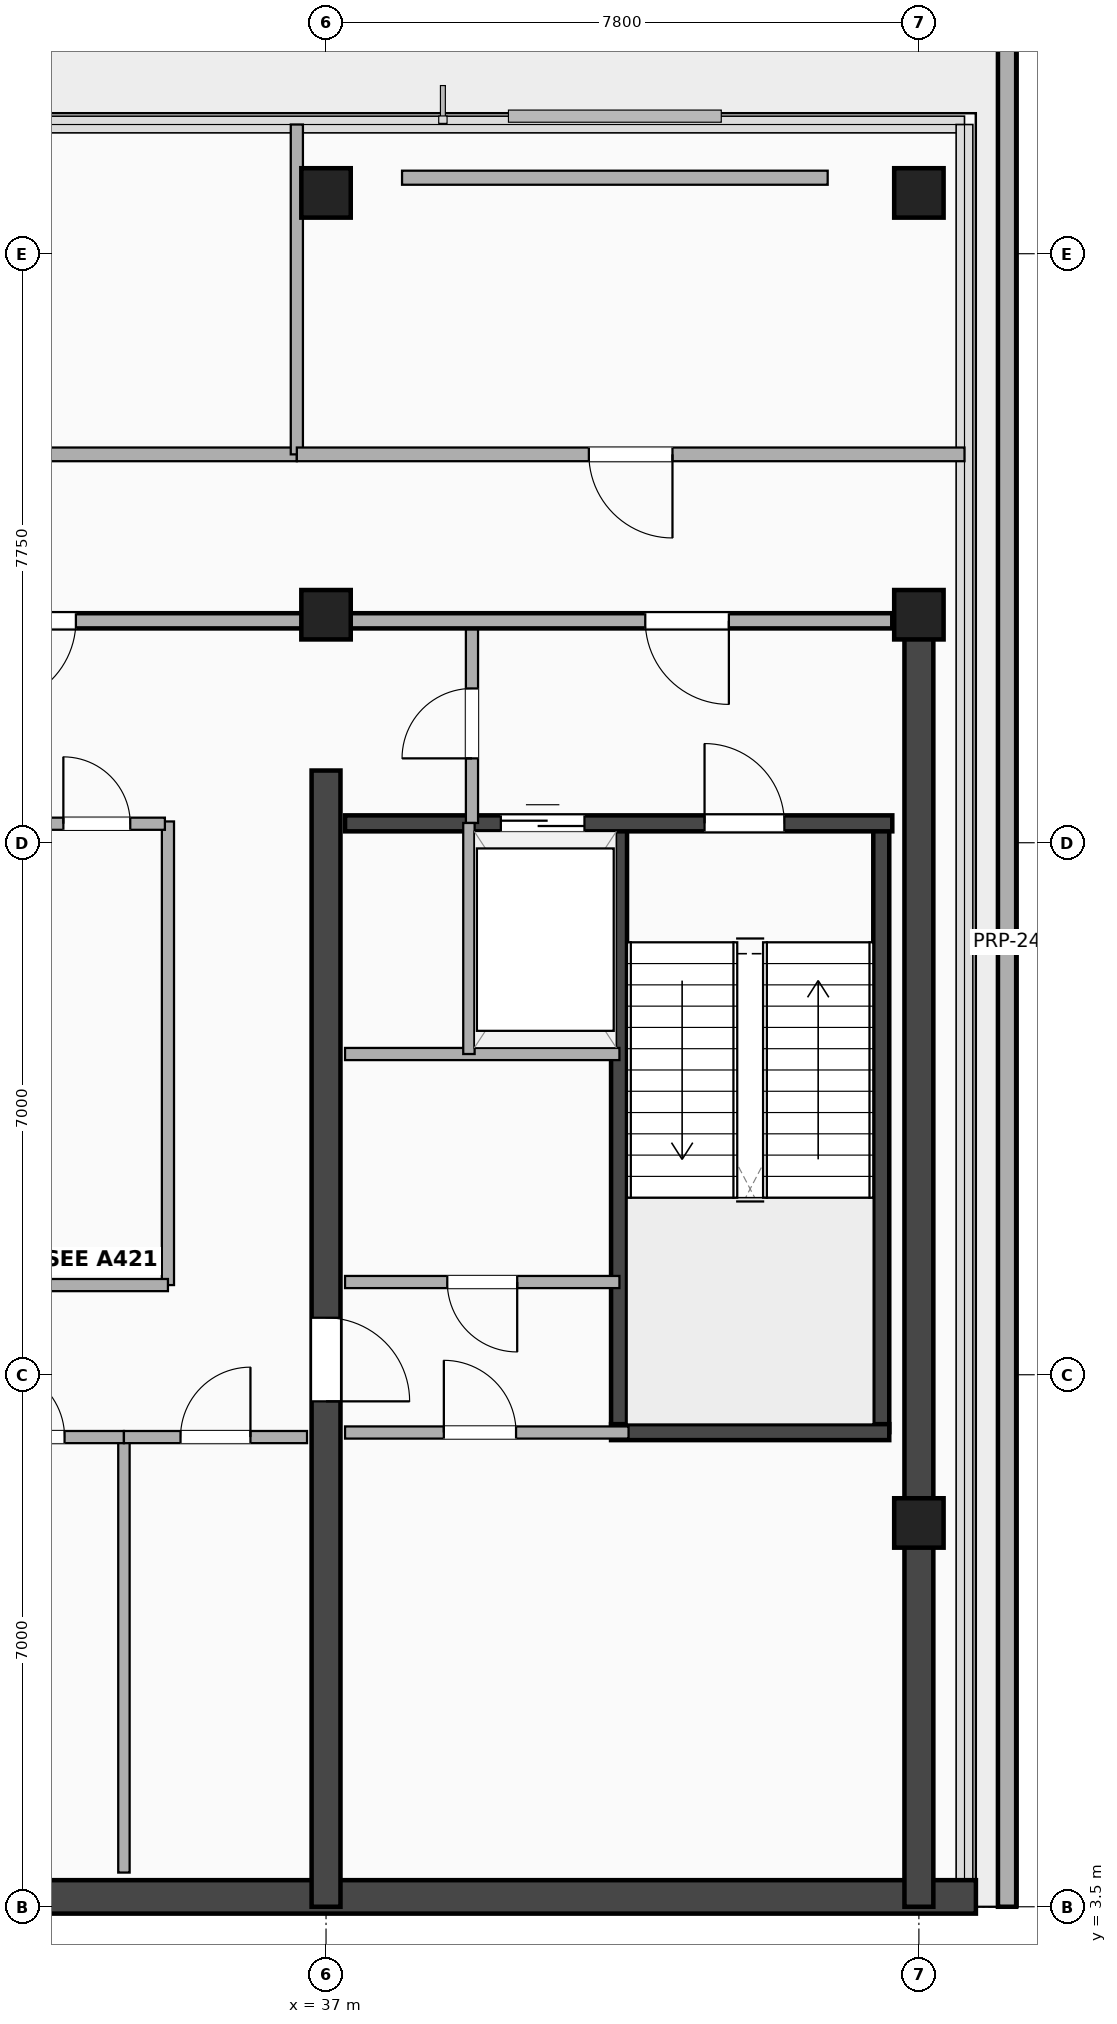
"""IFC4 building model, lengths in metres.
Left out: names, types, materials, properties, quantities, classifications, styles, units other than length and angle.
Written with IfcOpenShell. Run it as: python <this file> out.ifc"""

import sys

from ifc_helpers import new_model, si_unit, direction, frame, frame_2d, origin, origin_2d, place, context, subcontext, project, spatial, rectangle, extrude, element, fill, save


model = new_model("IFC4")
c1 = context("Model", 3, precision=1e-05, world=origin(), true_north=direction((0.0, 1.0)))
c2 = subcontext(c1, "Body", "Model", "MODEL_VIEW")
j1 = project(units=[si_unit("LENGTHUNIT", "METRE"), si_unit("PLANEANGLEUNIT", "RADIAN")], contexts=[c1])
p1 = place(None, origin())
s1 = spatial("IfcSite", under=j1, at=p1, CompositionType="ELEMENT")
p2 = place(p1, origin())
s2 = spatial("IfcBuilding", under=s1, at=p2, CompositionType="ELEMENT")
p3 = place(p2, frame((0.0, 0.0, 303.3)))
s3 = spatial("IfcBuildingStorey", under=s2, at=p3, CompositionType="ELEMENT", Elevation=303.3)
p4 = place(p3, frame((17.8, 3.63, 0.0), z_axis=(0.0, 0.0, 1.0), x_axis=(1.0, 0.0, 0.0)))
e1 = element("IfcWall", 1, at=p4, inside=s3, PredefinedType="SHEAR", context=c2, shape_type="SweptSolid", body=[
    extrude(rectangle(XDim=27.75, YDim=0.44, at=frame_2d((13.875, 0.0))), origin(), (0.0, 0.0, 1.0), 4.3),
])
p5 = place(p3, frame((44.8, 3.5, 0.0), z_axis=(0.0, 0.0, 1.0), x_axis=(0.0, 1.0, 0.0)))
e2 = element("IfcWall", 2, at=p5, inside=s3, PredefinedType="SHEAR", context=c2, shape_type="SweptSolid", body=[
    extrude(rectangle(XDim=16.9, YDim=0.38, at=frame_2d((8.45, 0.0))), origin(), (0.0, 0.0, 1.0), 4.3),
])
p6 = place(p3, frame((37.0, 3.5, 0.0), z_axis=(0.0, 0.0, 1.0), x_axis=(0.0, 1.0, 0.0)))
e3 = element("IfcWall", 3, at=p6, inside=s3, PredefinedType="SHEAR", context=c2, shape_type="SweptSolid", body=[
    extrude(rectangle(XDim=14.95, YDim=0.38, at=frame_2d((7.475, 0.0))), origin(), (0.0, 0.0, 1.0), 4.3),
])
p7 = place(p6, frame((6.65, 0.0, 0.0)))
e4 = element("IfcOpeningElement", 4, at=p7, cuts=e3, PredefinedType="OPENING", context=c2, shape_type="SweptSolid", body=[
    extrude(rectangle(XDim=1.1, YDim=2.15, at=frame_2d((0.55, 1.075))), frame((0.0, 0.2, 0.0), z_axis=(0.0, -1.0, 0.0), x_axis=(1.0, 0.0, 0.0)), (0.0, 0.0, 1.0), 0.4),
])
for number, where, z_axis, x_axis in (
    (5, (40.855, 9.745, 0.0), (0.0, 0.0, 1.0), (0.0, 1.0, 0.0)),
    (6, (44.305, 9.745, 0.0), (0.0, 0.0, 1.0), (0.0, 1.0, 0.0)),
):
    element("IfcWall", number, at=place(p3, frame(where, z_axis=z_axis, x_axis=x_axis)), inside=s3, PredefinedType="SHEAR", context=c2, shape_type="SweptSolid", body=[
        extrude(rectangle(XDim=8.01, YDim=0.21, at=frame_2d((4.005, 0.0))), origin(), (0.0, 0.0, 1.0), 4.3),
    ])
p8 = place(p3, frame((40.75, 9.745, 0.0), z_axis=(0.0, 0.0, 1.0), x_axis=(1.0, 0.0, 0.0)))
e7 = element("IfcWall", 7, at=p8, inside=s3, PredefinedType="SHEAR", context=c2, shape_type="SweptSolid", body=[
    extrude(rectangle(XDim=3.66, YDim=0.21, at=frame_2d((1.83, 0.0))), origin(), (0.0, 0.0, 1.0), 4.3),
])
p9 = place(p3, frame((37.25, 17.755, 0.0), z_axis=(0.0, 0.0, 1.0), x_axis=(1.0, 0.0, 0.0)))
e8 = element("IfcWall", 8, at=p9, inside=s3, PredefinedType="SHEAR", context=c2, shape_type="SweptSolid", body=[
    extrude(rectangle(XDim=7.2, YDim=0.21, at=frame_2d((3.6, 0.0))), origin(), (0.0, 0.0, 1.0), 4.3),
])
p10 = place(p9, frame((2.05, 0.0, 0.0)))
e9 = element("IfcOpeningElement", 9, at=p10, cuts=e8, PredefinedType="OPENING", context=c2, shape_type="SweptSolid", body=[
    extrude(rectangle(XDim=1.1, YDim=2.18, at=frame_2d((0.55, 1.09))), frame((0.0, 0.115, 0.0), z_axis=(0.0, -1.0, 0.0), x_axis=(1.0, 0.0, 0.0)), (0.0, 0.0, 1.0), 0.23),
])
p11 = place(p9, frame((5.78, 0.0, 0.0), z_axis=(0.0, 0.0, 1.0), x_axis=(-1.0, 0.0, 0.0)))
e10 = element("IfcOpeningElement", 10, at=p11, cuts=e8, PredefinedType="OPENING", context=c2, shape_type="SweptSolid", body=[
    extrude(rectangle(XDim=1.05, YDim=2.15, at=frame_2d((0.525, 1.075))), frame((0.0, 0.115, 0.0), z_axis=(0.0, -1.0, 0.0), x_axis=(1.0, 0.0, 0.0)), (0.0, 0.0, 1.0), 0.23),
])
for number, where, z_axis, x_axis in (
    (11, (44.8, 8.55, -0.3), (0.0, 0.0, 1.0), (1.0, 0.0, 0.0)),
    (12, (37.0, 20.5, -0.3), (0.0, 0.0, 1.0), (1.0, 0.0, 0.0)),
    (13, (44.8, 20.5, -0.3), (0.0, 0.0, 1.0), (1.0, 0.0, 0.0)),
    (14, (37.0, 26.05, -0.3), (0.0, 0.0, 1.0), (1.0, 0.0, 0.0)),
    (15, (44.8, 26.05, -0.3), (0.0, 0.0, 1.0), (1.0, 0.0, 0.0)),
):
    element("IfcColumn", number, at=place(p3, frame(where, z_axis=z_axis, x_axis=x_axis)), inside=s3, PredefinedType="COLUMN", context=c2, shape_type="SweptSolid", body=[
        extrude(rectangle(XDim=0.65, YDim=0.65, at=origin_2d()), origin(), (0.0, 0.0, 1.0), 4.6),
    ])
p12 = place(p3, frame((45.96, 3.5, 0.0), z_axis=(0.0, 0.0, 1.0), x_axis=(0.0, 1.0, 0.0)))
e16 = element("IfcWall", 16, at=p12, inside=s3, PredefinedType="PARAPET", context=c2, shape_type="SweptSolid", body=[
    extrude(rectangle(XDim=24.7, YDim=0.24, at=frame_2d((12.35, 0.0))), origin(), (0.0, 0.0, 1.0), 1.25),
])
p13 = place(p3, frame((38.0, 26.25, 0.0), z_axis=(0.0, 0.0, 1.0), x_axis=(1.0, 0.0, 0.0)))
e17 = element("IfcWall", 17, at=p13, inside=s3, PredefinedType="ELEMENTEDWALL", context=c2, shape_type="SweptSolid", body=[
    extrude(rectangle(XDim=5.6, YDim=0.185, at=frame_2d((2.8, 0.0))), origin(), (0.0, 0.0, 1.0), 3.885),
])
p14 = place(p3, frame((38.92, 17.76, 0.0), z_axis=(0.0, 0.0, 1.0), x_axis=(0.0, 1.0, 0.0)))
e18 = element("IfcWall", 18, at=p14, inside=s3, PredefinedType="PARTITIONING", context=c2, shape_type="SweptSolid", body=[
    extrude(rectangle(XDim=2.66, YDim=0.16, at=frame_2d((1.33, 0.0))), origin(), (0.0, 0.0, 1.0), 3.885),
])
p15 = place(p14, frame((1.77, 0.0, 0.0), z_axis=(0.0, 0.0, 1.0), x_axis=(-1.0, 0.0, 0.0)))
e19 = element("IfcOpeningElement", 19, at=p15, cuts=e18, PredefinedType="OPENING", context=c2, shape_type="SweptSolid", body=[
    extrude(rectangle(XDim=0.92, YDim=2.08, at=frame_2d((0.46, 1.04))), frame((0.0, 0.09, 0.0), z_axis=(0.0, -1.0, 0.0), x_axis=(1.0, 0.0, 0.0)), (0.0, 0.0, 1.0), 0.18),
])
p16 = place(p3, frame((37.25, 14.72, 0.0), z_axis=(0.0, 0.0, 1.0), x_axis=(1.0, 0.0, 0.0)))
e20 = element("IfcWall", 20, at=p16, inside=s3, PredefinedType="PARTITIONING", context=c2, shape_type="SweptSolid", body=[
    extrude(rectangle(XDim=3.61, YDim=0.16, at=frame_2d((1.805, 0.0))), origin(), (0.0, 0.0, 1.0), 4.3),
])
p17 = place(p3, frame((38.88, 14.72, 0.0), z_axis=(0.0, 0.0, 1.0), x_axis=(0.0, 1.0, 0.0)))
e21 = element("IfcWall", 21, at=p17, inside=s3, PredefinedType="PARTITIONING", context=c2, shape_type="SweptSolid", body=[
    extrude(rectangle(XDim=3.04, YDim=0.15, at=frame_2d((1.52, 0.0))), origin(), (0.0, 0.0, 1.0), 4.3),
])
p18 = place(p3, frame((29.2, 20.42, 0.0), z_axis=(0.0, 0.0, 1.0), x_axis=(1.0, 0.0, 0.0)))
e22 = element("IfcWall", 22, at=p18, inside=s3, PredefinedType="PARTITIONING", context=c2, shape_type="SweptSolid", body=[
    extrude(rectangle(XDim=7.8, YDim=0.2, at=frame_2d((3.9, 0.0))), origin(), (0.0, 0.0, 1.0), 2.605),
])
p19 = place(p18, frame((3.409, 0.0, 0.0)))
e23 = element("IfcOpeningElement", 23, at=p19, cuts=e22, PredefinedType="OPENING", context=c2, shape_type="SweptSolid", body=[
    extrude(rectangle(XDim=1.1, YDim=2.15, at=frame_2d((0.55, 1.075))), frame((0.0, 0.11, 0.0), z_axis=(0.0, -1.0, 0.0), x_axis=(1.0, 0.0, 0.0)), (0.0, 0.0, 1.0), 0.22),
])
p20 = place(p3, frame((37.0, 20.42, 0.0), z_axis=(0.0, 0.0, 1.0), x_axis=(1.0, 0.0, 0.0)))
e24 = element("IfcWall", 24, at=p20, inside=s3, PredefinedType="PARTITIONING", context=c2, shape_type="SweptSolid", body=[
    extrude(rectangle(XDim=7.45, YDim=0.2, at=frame_2d((3.725, 0.0))), origin(), (0.0, 0.0, 1.0), 2.605),
])
p21 = place(p20, frame((4.2, 0.0, 0.0)))
e25 = element("IfcOpeningElement", 25, at=p21, cuts=e24, PredefinedType="OPENING", context=c2, shape_type="SweptSolid", body=[
    extrude(rectangle(XDim=1.1, YDim=2.15, at=frame_2d((0.55, 1.075))), frame((0.0, 0.11, 0.0), z_axis=(0.0, -1.0, 0.0), x_axis=(1.0, 0.0, 0.0)), (0.0, 0.0, 1.0), 0.22),
])
p22 = place(p3, frame((37.25, 11.72, 0.0), z_axis=(0.0, 0.0, 1.0), x_axis=(1.0, 0.0, 0.0)))
e26 = element("IfcWall", 26, at=p22, inside=s3, PredefinedType="PARTITIONING", context=c2, shape_type="SweptSolid", body=[
    extrude(rectangle(XDim=3.61, YDim=0.16, at=frame_2d((1.805, 0.0))), origin(), (0.0, 0.0, 1.0), 4.3),
])
p23 = place(p22, frame((1.345, 0.0, 0.0)))
e27 = element("IfcOpeningElement", 27, at=p23, cuts=e26, PredefinedType="OPENING", context=c2, shape_type="SweptSolid", body=[
    extrude(rectangle(XDim=0.92, YDim=2.08, at=frame_2d((0.46, 1.04))), frame((0.0, 0.09, 0.0), z_axis=(0.0, -1.0, 0.0), x_axis=(1.0, 0.0, 0.0)), (0.0, 0.0, 1.0), 0.18),
])
p24 = place(p3, frame((37.25, 9.74, 0.0), z_axis=(0.0, 0.0, 1.0), x_axis=(1.0, 0.0, 0.0)))
e28 = element("IfcWall", 28, at=p24, inside=s3, PredefinedType="PARTITIONING", context=c2, shape_type="SweptSolid", body=[
    extrude(rectangle(XDim=3.73, YDim=0.16, at=frame_2d((1.865, 0.0))), origin(), (0.0, 0.0, 1.0), 4.3),
])
p25 = place(p24, frame((2.25, 0.0, 0.0), z_axis=(0.0, 0.0, 1.0), x_axis=(-1.0, 0.0, 0.0)))
e29 = element("IfcOpeningElement", 29, at=p25, cuts=e28, PredefinedType="OPENING", context=c2, shape_type="SweptSolid", body=[
    extrude(rectangle(XDim=0.95, YDim=2.15, at=frame_2d((0.475, 1.075))), frame((0.0, 0.09, 0.0), z_axis=(0.0, -1.0, 0.0), x_axis=(1.0, 0.0, 0.0)), (0.0, 0.0, 1.0), 0.18),
])
p26 = place(p3, frame((34.92, 11.68, 0.0), z_axis=(0.0, 0.0, 1.0), x_axis=(0.0, 1.0, 0.0)))
e30 = element("IfcWall", 30, at=p26, inside=s3, PredefinedType="PARTITIONING", context=c2, shape_type="SweptSolid", body=[
    extrude(rectangle(XDim=6.1, YDim=0.16, at=frame_2d((3.05, 0.0))), origin(), (0.0, 0.0, 1.0), 4.3),
])
p27 = place(p3, frame((34.341, 3.95, 0.0), z_axis=(0.0, 0.0, 1.0), x_axis=(0.0, 1.0, 0.0)))
e31 = element("IfcWall", 31, at=p27, inside=s3, PredefinedType="PARTITIONING", context=c2, shape_type="SweptSolid", body=[
    extrude(rectangle(XDim=5.73, YDim=0.15, at=frame_2d((2.865, 0.0))), origin(), (0.0, 0.0, 1.0), 3.885),
])
p28 = place(p3, frame((31.859, 9.68, 0.0), z_axis=(0.0, 0.0, 1.0), x_axis=(1.0, 0.0, 0.0)))
e32 = element("IfcWall", 32, at=p28, inside=s3, PredefinedType="PARTITIONING", context=c2, shape_type="SweptSolid", body=[
    extrude(rectangle(XDim=2.482, YDim=0.16, at=frame_2d((1.241, 0.0))), origin(), (0.0, 0.0, 1.0), 4.3),
])
p29 = place(p28, frame((1.701, 0.0, 0.0), z_axis=(0.0, 0.0, 1.0), x_axis=(-1.0, 0.0, 0.0)))
e33 = element("IfcOpeningElement", 33, at=p29, cuts=e32, PredefinedType="OPENING", context=c2, shape_type="SweptSolid", body=[
    extrude(rectangle(XDim=0.92, YDim=2.08, at=frame_2d((0.46, 1.04))), frame((0.0, 0.09, 0.0), z_axis=(0.0, -1.0, 0.0), x_axis=(1.0, 0.0, 0.0)), (0.0, 0.0, 1.0), 0.18),
])
p30 = place(p3, frame((34.341, 9.68, 0.0), z_axis=(0.0, 0.0, 1.0), x_axis=(1.0, 0.0, 0.0)))
e34 = element("IfcWall", 34, at=p30, inside=s3, PredefinedType="PARTITIONING", context=c2, shape_type="SweptSolid", body=[
    extrude(rectangle(XDim=2.409, YDim=0.16, at=frame_2d((1.205, 0.0))), origin(), (0.0, 0.0, 1.0), 4.3),
])
p31 = place(p30, frame((1.664, 0.0, 0.0), z_axis=(0.0, 0.0, 1.0), x_axis=(-1.0, 0.0, 0.0)))
e35 = element("IfcOpeningElement", 35, at=p31, cuts=e34, PredefinedType="OPENING", context=c2, shape_type="SweptSolid", body=[
    extrude(rectangle(XDim=0.92, YDim=2.08, at=frame_2d((0.46, 1.04))), frame((0.0, 0.09, 0.0), z_axis=(0.0, -1.0, 0.0), x_axis=(1.0, 0.0, 0.0)), (0.0, 0.0, 1.0), 0.18),
])
p32 = place(p3, frame((29.2, 11.68, 0.0), z_axis=(0.0, 0.0, 1.0), x_axis=(1.0, 0.0, 0.0)))
e36 = element("IfcWall", 36, at=p32, inside=s3, PredefinedType="PARTITIONING", context=c2, shape_type="SweptSolid", body=[
    extrude(rectangle(XDim=5.72, YDim=0.16, at=frame_2d((2.86, 0.0))), origin(), (0.0, 0.0, 1.0), 4.3),
])
p33 = place(p3, frame((33.088, 17.75, 0.0), z_axis=(0.0, 0.0, 1.0), x_axis=(1.0, 0.0, 0.0)))
e37 = element("IfcWall", 37, at=p33, inside=s3, PredefinedType="PARTITIONING", context=c2, shape_type="SweptSolid", body=[
    extrude(rectangle(XDim=1.792, YDim=0.16, at=frame_2d((0.896, 0.0))), origin(), (0.0, 0.0, 1.0), 4.3),
])
p34 = place(p33, frame((1.336, 0.0, 0.0), z_axis=(0.0, 0.0, 1.0), x_axis=(-1.0, 0.0, 0.0)))
e38 = element("IfcOpeningElement", 38, at=p34, cuts=e37, PredefinedType="OPENING", context=c2, shape_type="SweptSolid", body=[
    extrude(rectangle(XDim=0.88, YDim=2.08, at=frame_2d((0.44, 1.04))), frame((0.0, 0.09, 0.0), z_axis=(0.0, -1.0, 0.0), x_axis=(1.0, 0.0, 0.0)), (0.0, 0.0, 1.0), 0.18),
])
p35 = place(p3, frame((27.558, 22.61, 0.0), z_axis=(0.0, 0.0, 1.0), x_axis=(1.0, 0.0, 0.0)))
e39 = element("IfcWall", 39, at=p35, inside=s3, PredefinedType="PARTITIONING", context=c2, shape_type="SweptSolid", body=[
    extrude(rectangle(XDim=9.058, YDim=0.18, at=frame_2d((4.529, 0.0))), origin(), (0.0, 0.0, 1.0), 2.605),
])
p36 = place(p35, frame((3.979, 0.0, 0.0)))
e40 = element("IfcOpeningElement", 40, at=p36, cuts=e39, PredefinedType="OPENING", context=c2, shape_type="SweptSolid", body=[
    extrude(rectangle(XDim=1.1, YDim=2.15, at=frame_2d((0.55, 1.075))), frame((0.0, 0.1, 0.0), z_axis=(0.0, -1.0, 0.0), x_axis=(1.0, 0.0, 0.0)), (0.0, 0.0, 1.0), 0.2),
])
p37 = place(p3, frame((36.616, 22.61, 0.0), z_axis=(0.0, 0.0, 1.0), x_axis=(0.0, 1.0, 0.0)))
e41 = element("IfcWall", 41, at=p37, inside=s3, PredefinedType="PARTITIONING", context=c2, shape_type="SweptSolid", body=[
    extrude(rectangle(XDim=4.34, YDim=0.16, at=frame_2d((2.17, 0.0))), origin(), (0.0, 0.0, 1.0), 2.605),
])
p38 = place(p3, frame((36.616, 22.61, 0.0), z_axis=(0.0, 0.0, 1.0), x_axis=(1.0, 0.0, 0.0)))
e42 = element("IfcWall", 42, at=p38, inside=s3, PredefinedType="PARTITIONING", context=c2, shape_type="SweptSolid", body=[
    extrude(rectangle(XDim=8.784, YDim=0.18, at=frame_2d((4.392, 0.0))), origin(), (0.0, 0.0, 1.0), 2.605),
])
p39 = place(p38, frame((3.842, 0.0, 0.0)))
e43 = element("IfcOpeningElement", 43, at=p39, cuts=e42, PredefinedType="OPENING", context=c2, shape_type="SweptSolid", body=[
    extrude(rectangle(XDim=1.1, YDim=2.15, at=frame_2d((0.55, 1.075))), frame((0.0, 0.1, 0.0), z_axis=(0.0, -1.0, 0.0), x_axis=(1.0, 0.0, 0.0)), (0.0, 0.0, 1.0), 0.2),
])
p40 = place(p10, origin())
e44 = element("IfcDoor", 44, at=p40, inside=s3, OperationType="DOUBLE_DOOR_SLIDING", PredefinedType="DOOR", context=c2, shape_type="SweptSolid", body=[
    extrude(rectangle(XDim=1.1, YDim=2.18, at=frame_2d((0.55, 1.09))), frame((0.0, 0.025, 0.0), z_axis=(0.0, -1.0, 0.0), x_axis=(1.0, 0.0, 0.0)), (0.0, 0.0, 1.0), 0.05),
])
fill(e9, e44)
p41 = place(p11, origin())
e45 = element("IfcDoor", 45, at=p41, inside=s3, OperationType="SINGLE_SWING_LEFT", PredefinedType="DOOR", context=c2, shape_type="SweptSolid", body=[
    extrude(rectangle(XDim=1.05, YDim=2.15, at=frame_2d((0.525, 1.075))), frame((0.0, 0.025, 0.0), z_axis=(0.0, -1.0, 0.0), x_axis=(1.0, 0.0, 0.0)), (0.0, 0.0, 1.0), 0.05),
])
fill(e10, e45)
p42 = place(p7, origin())
e46 = element("IfcDoor", 46, at=p42, inside=s3, OperationType="SINGLE_SWING_LEFT", PredefinedType="DOOR", context=c2, shape_type="SweptSolid", body=[
    extrude(rectangle(XDim=1.1, YDim=2.15, at=frame_2d((0.55, 1.075))), frame((0.0, 0.025, 0.0), z_axis=(0.0, -1.0, 0.0), x_axis=(1.0, 0.0, 0.0)), (0.0, 0.0, 1.0), 0.05),
])
fill(e4, e46)
p43 = place(p15, origin())
e47 = element("IfcDoor", 47, at=p43, inside=s3, OperationType="SINGLE_SWING_LEFT", PredefinedType="DOOR", context=c2, shape_type="SweptSolid", body=[
    extrude(rectangle(XDim=0.92, YDim=2.08, at=frame_2d((0.46, 1.04))), frame((0.0, 0.025, 0.0), z_axis=(0.0, -1.0, 0.0), x_axis=(1.0, 0.0, 0.0)), (0.0, 0.0, 1.0), 0.05),
])
fill(e19, e47)
p44 = place(p19, origin())
e48 = element("IfcDoor", 48, at=p44, inside=s3, OperationType="SINGLE_SWING_LEFT", PredefinedType="DOOR", context=c2, shape_type="SweptSolid", body=[
    extrude(rectangle(XDim=1.1, YDim=2.15, at=frame_2d((0.55, 1.075))), frame((0.0, 0.025, 0.0), z_axis=(0.0, -1.0, 0.0), x_axis=(1.0, 0.0, 0.0)), (0.0, 0.0, 1.0), 0.05),
])
fill(e23, e48)
p45 = place(p21, origin())
e49 = element("IfcDoor", 49, at=p45, inside=s3, OperationType="SINGLE_SWING_RIGHT", PredefinedType="DOOR", context=c2, shape_type="SweptSolid", body=[
    extrude(rectangle(XDim=1.1, YDim=2.15, at=frame_2d((0.55, 1.075))), frame((0.0, 0.025, 0.0), z_axis=(0.0, -1.0, 0.0), x_axis=(1.0, 0.0, 0.0)), (0.0, 0.0, 1.0), 0.05),
])
fill(e25, e49)
p46 = place(p23, origin())
e50 = element("IfcDoor", 50, at=p46, inside=s3, OperationType="SINGLE_SWING_RIGHT", PredefinedType="DOOR", context=c2, shape_type="SweptSolid", body=[
    extrude(rectangle(XDim=0.92, YDim=2.08, at=frame_2d((0.46, 1.04))), frame((0.0, 0.025, 0.0), z_axis=(0.0, -1.0, 0.0), x_axis=(1.0, 0.0, 0.0)), (0.0, 0.0, 1.0), 0.05),
])
fill(e27, e50)
p47 = place(p25, origin())
e51 = element("IfcDoor", 51, at=p47, inside=s3, OperationType="SINGLE_SWING_LEFT", PredefinedType="DOOR", context=c2, shape_type="SweptSolid", body=[
    extrude(rectangle(XDim=0.95, YDim=2.15, at=frame_2d((0.475, 1.075))), frame((0.0, 0.025, 0.0), z_axis=(0.0, -1.0, 0.0), x_axis=(1.0, 0.0, 0.0)), (0.0, 0.0, 1.0), 0.05),
])
fill(e29, e51)
p48 = place(p29, origin())
e52 = element("IfcDoor", 52, at=p48, inside=s3, OperationType="SINGLE_SWING_LEFT", PredefinedType="DOOR", context=c2, shape_type="SweptSolid", body=[
    extrude(rectangle(XDim=0.92, YDim=2.08, at=frame_2d((0.46, 1.04))), frame((0.0, 0.025, 0.0), z_axis=(0.0, -1.0, 0.0), x_axis=(1.0, 0.0, 0.0)), (0.0, 0.0, 1.0), 0.05),
])
fill(e33, e52)
p49 = place(p31, origin())
e53 = element("IfcDoor", 53, at=p49, inside=s3, OperationType="SINGLE_SWING_RIGHT", PredefinedType="DOOR", context=c2, shape_type="SweptSolid", body=[
    extrude(rectangle(XDim=0.92, YDim=2.08, at=frame_2d((0.46, 1.04))), frame((0.0, 0.025, 0.0), z_axis=(0.0, -1.0, 0.0), x_axis=(1.0, 0.0, 0.0)), (0.0, 0.0, 1.0), 0.05),
])
fill(e35, e53)
p50 = place(p34, origin())
e54 = element("IfcDoor", 54, at=p50, inside=s3, OperationType="SINGLE_SWING_LEFT", PredefinedType="DOOR", context=c2, shape_type="SweptSolid", body=[
    extrude(rectangle(XDim=0.88, YDim=2.08, at=frame_2d((0.44, 1.04))), frame((0.0, 0.025, 0.0), z_axis=(0.0, -1.0, 0.0), x_axis=(1.0, 0.0, 0.0)), (0.0, 0.0, 1.0), 0.05),
])
fill(e38, e54)
p51 = place(p39, origin())
e55 = element("IfcDoor", 55, at=p51, inside=s3, OperationType="SINGLE_SWING_RIGHT", PredefinedType="DOOR", context=c2, shape_type="SweptSolid", body=[
    extrude(rectangle(XDim=1.1, YDim=2.15, at=frame_2d((0.55, 1.075))), frame((0.0, 0.025, 0.0), z_axis=(0.0, -1.0, 0.0), x_axis=(1.0, 0.0, 0.0)), (0.0, 0.0, 1.0), 0.05),
])
fill(e43, e55)
save(model, sys.argv[1])
